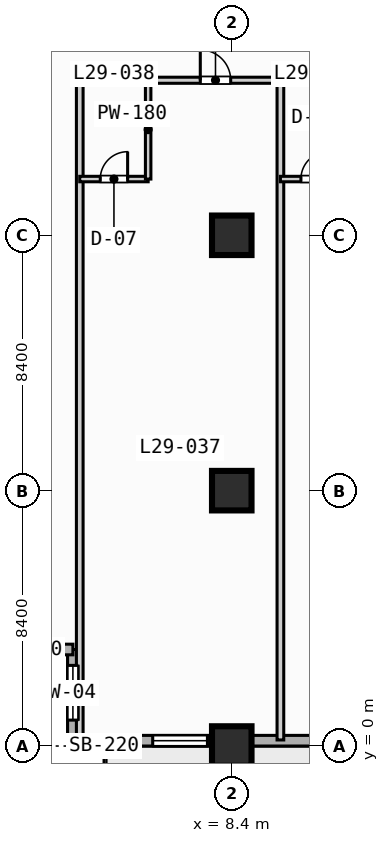
"""IFC4 building model, lengths in metres.
Left out: names, types, materials, properties, quantities, classifications, styles, units other than length and angle.
Written with IfcOpenShell. Run it as: python <this file> out.ifc"""

import sys

from ifc_helpers import new_model, si_unit, direction, frame, frame_2d, origin, origin_2d, place, context, subcontext, project, spatial, rectangle, extrude, element, fill, save


model = new_model("IFC4")
c1 = context("Model", 3, precision=1e-05, world=origin(), true_north=direction((0.0, 1.0)))
c2 = subcontext(c1, "Body", "Model", "MODEL_VIEW")
j1 = project(units=[si_unit("LENGTHUNIT", "METRE"), si_unit("PLANEANGLEUNIT", "RADIAN")], contexts=[c1])
p1 = place(None, origin())
s1 = spatial("IfcSite", under=j1, at=p1, CompositionType="ELEMENT")
p2 = place(p1, origin())
s2 = spatial("IfcBuilding", under=s1, at=p2, CompositionType="ELEMENT")
p3 = place(p2, frame((0.0, 0.0, 122.8)))
s3 = spatial("IfcBuildingStorey", under=s2, at=p3, CompositionType="ELEMENT", Elevation=122.8)
for number, where, z_axis, x_axis in (
    (1, (8.4, 0.0, 0.0), (0.0, 0.0, 1.0), (1.0, 0.0, 0.0)),
    (2, (8.4, 8.4, 0.0), (0.0, 0.0, 1.0), (1.0, 0.0, 0.0)),
    (3, (8.4, 16.8, 0.0), (0.0, 0.0, 1.0), (1.0, 0.0, 0.0)),
):
    element("IfcColumn", number, at=place(p3, frame(where, z_axis=z_axis, x_axis=x_axis)), inside=s3, PredefinedType="COLUMN", context=c2, shape_type="SweptSolid", body=[
        extrude(rectangle(XDim=1.3, YDim=1.3, at=origin_2d()), origin(), (0.0, 0.0, 1.0), 3.8),
    ])
p4 = place(p3, frame((3.175, 0.175, 0.0), z_axis=(0.0, 0.0, 1.0), x_axis=(0.0, 1.0, 0.0)))
e4 = element("IfcWall", 4, at=p4, inside=s3, PredefinedType="STANDARD", context=c2, shape_type="SweptSolid", body=[
    extrude(rectangle(XDim=3.0, YDim=0.35, at=frame_2d((1.5, 0.0))), origin(), (0.0, 0.0, 1.0), 3.55),
])
p5 = place(p4, frame((0.677, 0.0, 0.85)))
e5 = element("IfcOpeningElement", 5, at=p5, cuts=e4, PredefinedType="OPENING", context=c2, shape_type="SweptSolid", body=[
    extrude(rectangle(XDim=1.8, YDim=1.8, at=frame_2d((0.9, 0.9))), frame((0.0, 0.185, 0.0), z_axis=(0.0, -1.0, 0.0), x_axis=(1.0, 0.0, 0.0)), (0.0, 0.0, 1.0), 0.37),
])
p6 = place(p3, frame((3.175, 3.175, 0.0), z_axis=(0.0, 0.0, 1.0), x_axis=(-1.0, 0.0, 0.0)))
e6 = element("IfcWall", 6, at=p6, inside=s3, PredefinedType="STANDARD", context=c2, shape_type="SweptSolid", body=[
    extrude(rectangle(XDim=3.0, YDim=0.35, at=frame_2d((1.5, 0.0))), origin(), (0.0, 0.0, 1.0), 3.55),
])
p7 = place(p3, frame((72.425, 0.175, 0.0), z_axis=(0.0, 0.0, 1.0), x_axis=(-1.0, 0.0, 0.0)))
e7 = element("IfcWall", 7, at=p7, inside=s3, PredefinedType="STANDARD", context=c2, shape_type="SweptSolid", body=[
    extrude(rectangle(XDim=69.25, YDim=0.35, at=frame_2d((34.625, 0.0))), origin(), (0.0, 0.0, 1.0), 3.55),
])
p8 = place(p7, frame((50.725, 0.0, 0.0)))
e8 = element("IfcOpeningElement", 8, at=p8, cuts=e7, PredefinedType="OPENING", context=c2, shape_type="SweptSolid", body=[
    extrude(rectangle(XDim=1.4, YDim=2.2, at=frame_2d((0.7, 1.1))), frame((0.0, 0.185, 0.0), z_axis=(0.0, -1.0, 0.0), x_axis=(1.0, 0.0, 0.0)), (0.0, 0.0, 1.0), 0.37),
])
p9 = place(p7, frame((58.725, 0.0, 0.85)))
e9 = element("IfcOpeningElement", 9, at=p9, cuts=e7, PredefinedType="OPENING", context=c2, shape_type="SweptSolid", body=[
    extrude(rectangle(XDim=2.2, YDim=1.8, at=frame_2d((1.1, 0.9))), frame((0.0, 0.185, 0.0), z_axis=(0.0, -1.0, 0.0), x_axis=(1.0, 0.0, 0.0)), (0.0, 0.0, 1.0), 0.37),
])
p10 = place(p7, frame((41.925, 0.0, 0.85)))
e10 = element("IfcOpeningElement", 10, at=p10, cuts=e7, PredefinedType="OPENING", context=c2, shape_type="SweptSolid", body=[
    extrude(rectangle(XDim=2.2, YDim=1.8, at=frame_2d((1.1, 0.9))), frame((0.0, 0.185, 0.0), z_axis=(0.0, -1.0, 0.0), x_axis=(1.0, 0.0, 0.0)), (0.0, 0.0, 1.0), 0.37),
])
p11 = place(p7, frame((33.525, 0.0, 0.85)))
e11 = element("IfcOpeningElement", 11, at=p11, cuts=e7, PredefinedType="OPENING", context=c2, shape_type="SweptSolid", body=[
    extrude(rectangle(XDim=2.2, YDim=1.8, at=frame_2d((1.1, 0.9))), frame((0.0, 0.185, 0.0), z_axis=(0.0, -1.0, 0.0), x_axis=(1.0, 0.0, 0.0)), (0.0, 0.0, 1.0), 0.37),
])
p12 = place(p7, frame((25.125, 0.0, 0.85)))
e12 = element("IfcOpeningElement", 12, at=p12, cuts=e7, PredefinedType="OPENING", context=c2, shape_type="SweptSolid", body=[
    extrude(rectangle(XDim=2.2, YDim=1.8, at=frame_2d((1.1, 0.9))), frame((0.0, 0.185, 0.0), z_axis=(0.0, -1.0, 0.0), x_axis=(1.0, 0.0, 0.0)), (0.0, 0.0, 1.0), 0.37),
])
p13 = place(p7, frame((64.825, 0.0, 0.85)))
e13 = element("IfcOpeningElement", 13, at=p13, cuts=e7, PredefinedType="OPENING", context=c2, shape_type="SweptSolid", body=[
    extrude(rectangle(XDim=1.8, YDim=1.8, at=frame_2d((0.9, 0.9))), frame((0.0, 0.185, 0.0), z_axis=(0.0, -1.0, 0.0), x_axis=(1.0, 0.0, 0.0)), (0.0, 0.0, 1.0), 0.37),
])
p14 = place(p7, frame((48.025, 0.0, 0.85)))
e14 = element("IfcOpeningElement", 14, at=p14, cuts=e7, PredefinedType="OPENING", context=c2, shape_type="SweptSolid", body=[
    extrude(rectangle(XDim=1.8, YDim=1.8, at=frame_2d((0.9, 0.9))), frame((0.0, 0.185, 0.0), z_axis=(0.0, -1.0, 0.0), x_axis=(1.0, 0.0, 0.0)), (0.0, 0.0, 1.0), 0.37),
])
p15 = place(p3, frame((3.4, 21.9, 0.0), z_axis=(0.0, 0.0, 1.0), x_axis=(1.0, 0.0, 0.0)))
e15 = element("IfcWall", 15, at=p15, inside=s3, PredefinedType="PARTITIONING", context=c2, shape_type="SweptSolid", body=[
    extrude(rectangle(XDim=35.8, YDim=0.2, at=frame_2d((17.9, 0.0))), origin(), (0.0, 0.0, 1.0), 3.55),
])
p16 = place(p15, frame((3.965, 0.0, 0.0)))
e16 = element("IfcOpeningElement", 16, at=p16, cuts=e15, PredefinedType="OPENING", context=c2, shape_type="SweptSolid", body=[
    extrude(rectangle(XDim=1.0, YDim=2.15, at=frame_2d((0.5, 1.075))), frame((0.0, 0.11, 0.0), z_axis=(0.0, -1.0, 0.0), x_axis=(1.0, 0.0, 0.0)), (0.0, 0.0, 1.0), 0.22),
])
p17 = place(p15, frame((10.565, 0.0, 0.0)))
e17 = element("IfcOpeningElement", 17, at=p17, cuts=e15, PredefinedType="OPENING", context=c2, shape_type="SweptSolid", body=[
    extrude(rectangle(XDim=1.0, YDim=2.15, at=frame_2d((0.5, 1.075))), frame((0.0, 0.11, 0.0), z_axis=(0.0, -1.0, 0.0), x_axis=(1.0, 0.0, 0.0)), (0.0, 0.0, 1.0), 0.22),
])
p18 = place(p15, frame((14.34, 0.0, 0.0)))
e18 = element("IfcOpeningElement", 18, at=p18, cuts=e15, PredefinedType="OPENING", context=c2, shape_type="SweptSolid", body=[
    extrude(rectangle(XDim=1.0, YDim=2.15, at=frame_2d((0.5, 1.075))), frame((0.0, 0.11, 0.0), z_axis=(0.0, -1.0, 0.0), x_axis=(1.0, 0.0, 0.0)), (0.0, 0.0, 1.0), 0.22),
])
p19 = place(p15, frame((22.26, 0.0, 0.0)))
e19 = element("IfcOpeningElement", 19, at=p19, cuts=e15, PredefinedType="OPENING", context=c2, shape_type="SweptSolid", body=[
    extrude(rectangle(XDim=1.0, YDim=2.15, at=frame_2d((0.5, 1.075))), frame((0.0, 0.11, 0.0), z_axis=(0.0, -1.0, 0.0), x_axis=(1.0, 0.0, 0.0)), (0.0, 0.0, 1.0), 0.22),
])
p20 = place(p15, frame((27.915, 0.0, 0.0)))
e20 = element("IfcOpeningElement", 20, at=p20, cuts=e15, PredefinedType="OPENING", context=c2, shape_type="SweptSolid", body=[
    extrude(rectangle(XDim=1.0, YDim=2.15, at=frame_2d((0.5, 1.075))), frame((0.0, 0.11, 0.0), z_axis=(0.0, -1.0, 0.0), x_axis=(1.0, 0.0, 0.0)), (0.0, 0.0, 1.0), 0.22),
])
p21 = place(p15, frame((31.285, 0.0, 0.0)))
e21 = element("IfcOpeningElement", 21, at=p21, cuts=e15, PredefinedType="OPENING", context=c2, shape_type="SweptSolid", body=[
    extrude(rectangle(XDim=1.0, YDim=2.15, at=frame_2d((0.5, 1.075))), frame((0.0, 0.11, 0.0), z_axis=(0.0, -1.0, 0.0), x_axis=(1.0, 0.0, 0.0)), (0.0, 0.0, 1.0), 0.22),
])
p22 = place(p3, frame((3.4, 0.2, 0.0), z_axis=(0.0, 0.0, 1.0), x_axis=(0.0, 1.0, 0.0)))
e22 = element("IfcWall", 22, at=p22, inside=s3, PredefinedType="PARTITIONING", context=c2, shape_type="SweptSolid", body=[
    extrude(rectangle(XDim=21.88, YDim=0.22, at=frame_2d((10.94, 0.0))), origin(), (0.0, 0.0, 1.0), 3.55),
])
p23 = place(p3, frame((3.4, 18.65, 0.0), z_axis=(0.0, 0.0, 1.0), x_axis=(1.0, 0.0, 0.0)))
e23 = element("IfcWall", 23, at=p23, inside=s3, PredefinedType="PLUMBINGWALL", context=c2, shape_type="SweptSolid", body=[
    extrude(rectangle(XDim=2.25, YDim=0.18, at=frame_2d((1.125, 0.0))), origin(), (0.0, 0.0, 1.0), 3.55),
])
p24 = place(p23, frame((0.675, 0.0, 0.0)))
e24 = element("IfcOpeningElement", 24, at=p24, cuts=e23, PredefinedType="OPENING", context=c2, shape_type="SweptSolid", body=[
    extrude(rectangle(XDim=0.9, YDim=2.1, at=frame_2d((0.45, 1.05))), frame((0.0, 0.1, 0.0), z_axis=(0.0, -1.0, 0.0), x_axis=(1.0, 0.0, 0.0)), (0.0, 0.0, 1.0), 0.2),
])
p25 = place(p3, frame((5.65, 18.65, 0.0), z_axis=(0.0, 0.0, 1.0), x_axis=(0.0, 1.0, 0.0)))
e25 = element("IfcWall", 25, at=p25, inside=s3, PredefinedType="PLUMBINGWALL", context=c2, shape_type="SweptSolid", body=[
    extrude(rectangle(XDim=3.25, YDim=0.18, at=frame_2d((1.625, 0.0))), origin(), (0.0, 0.0, 1.0), 3.55),
])
p26 = place(p3, frame((10.0, 0.2, 0.0), z_axis=(0.0, 0.0, 1.0), x_axis=(0.0, 1.0, 0.0)))
e26 = element("IfcWall", 26, at=p26, inside=s3, PredefinedType="PARTITIONING", context=c2, shape_type="SweptSolid", body=[
    extrude(rectangle(XDim=21.88, YDim=0.22, at=frame_2d((10.94, 0.0))), origin(), (0.0, 0.0, 1.0), 3.55),
])
p27 = place(p3, frame((10.0, 18.65, 0.0), z_axis=(0.0, 0.0, 1.0), x_axis=(1.0, 0.0, 0.0)))
e27 = element("IfcWall", 27, at=p27, inside=s3, PredefinedType="PLUMBINGWALL", context=c2, shape_type="SweptSolid", body=[
    extrude(rectangle(XDim=2.25, YDim=0.18, at=frame_2d((1.125, 0.0))), origin(), (0.0, 0.0, 1.0), 3.55),
])
p28 = place(p27, frame((0.675, 0.0, 0.0)))
e28 = element("IfcOpeningElement", 28, at=p28, cuts=e27, PredefinedType="OPENING", context=c2, shape_type="SweptSolid", body=[
    extrude(rectangle(XDim=0.9, YDim=2.1, at=frame_2d((0.45, 1.05))), frame((0.0, 0.1, 0.0), z_axis=(0.0, -1.0, 0.0), x_axis=(1.0, 0.0, 0.0)), (0.0, 0.0, 1.0), 0.2),
])
p29 = place(p5, origin())
e29 = element("IfcWindow", 29, at=p29, inside=s3, PartitioningType="SINGLE_PANEL", PredefinedType="WINDOW", context=c2, shape_type="SweptSolid", body=[
    extrude(rectangle(XDim=1.8, YDim=1.8, at=frame_2d((0.9, 0.9))), frame((0.0, 0.03, 0.0), z_axis=(0.0, -1.0, 0.0), x_axis=(1.0, 0.0, 0.0)), (0.0, 0.0, 1.0), 0.06),
])
fill(e5, e29)
p30 = place(p13, origin())
e30 = element("IfcWindow", 30, at=p30, inside=s3, PartitioningType="SINGLE_PANEL", PredefinedType="WINDOW", context=c2, shape_type="SweptSolid", body=[
    extrude(rectangle(XDim=1.8, YDim=1.8, at=frame_2d((0.9, 0.9))), frame((0.0, 0.03, 0.0), z_axis=(0.0, -1.0, 0.0), x_axis=(1.0, 0.0, 0.0)), (0.0, 0.0, 1.0), 0.06),
])
fill(e13, e30)
p31 = place(p16, origin())
e31 = element("IfcDoor", 31, at=p31, inside=s3, OperationType="SINGLE_SWING_LEFT", PredefinedType="DOOR", context=c2, shape_type="SweptSolid", body=[
    extrude(rectangle(XDim=1.0, YDim=2.15, at=frame_2d((0.5, 1.075))), frame((0.0, 0.025, 0.0), z_axis=(0.0, -1.0, 0.0), x_axis=(1.0, 0.0, 0.0)), (0.0, 0.0, 1.0), 0.05),
])
fill(e16, e31)
p32 = place(p24, origin())
e32 = element("IfcDoor", 32, at=p32, inside=s3, OperationType="SINGLE_SWING_RIGHT", PredefinedType="DOOR", context=c2, shape_type="SweptSolid", body=[
    extrude(rectangle(XDim=0.9, YDim=2.1, at=frame_2d((0.45, 1.05))), frame((0.0, 0.025, 0.0), z_axis=(0.0, -1.0, 0.0), x_axis=(1.0, 0.0, 0.0)), (0.0, 0.0, 1.0), 0.05),
])
fill(e24, e32)
p33 = place(p28, origin())
e33 = element("IfcDoor", 33, at=p33, inside=s3, OperationType="SINGLE_SWING_RIGHT", PredefinedType="DOOR", context=c2, shape_type="SweptSolid", body=[
    extrude(rectangle(XDim=0.9, YDim=2.1, at=frame_2d((0.45, 1.05))), frame((0.0, 0.025, 0.0), z_axis=(0.0, -1.0, 0.0), x_axis=(1.0, 0.0, 0.0)), (0.0, 0.0, 1.0), 0.05),
])
fill(e28, e33)
save(model, sys.argv[1])
